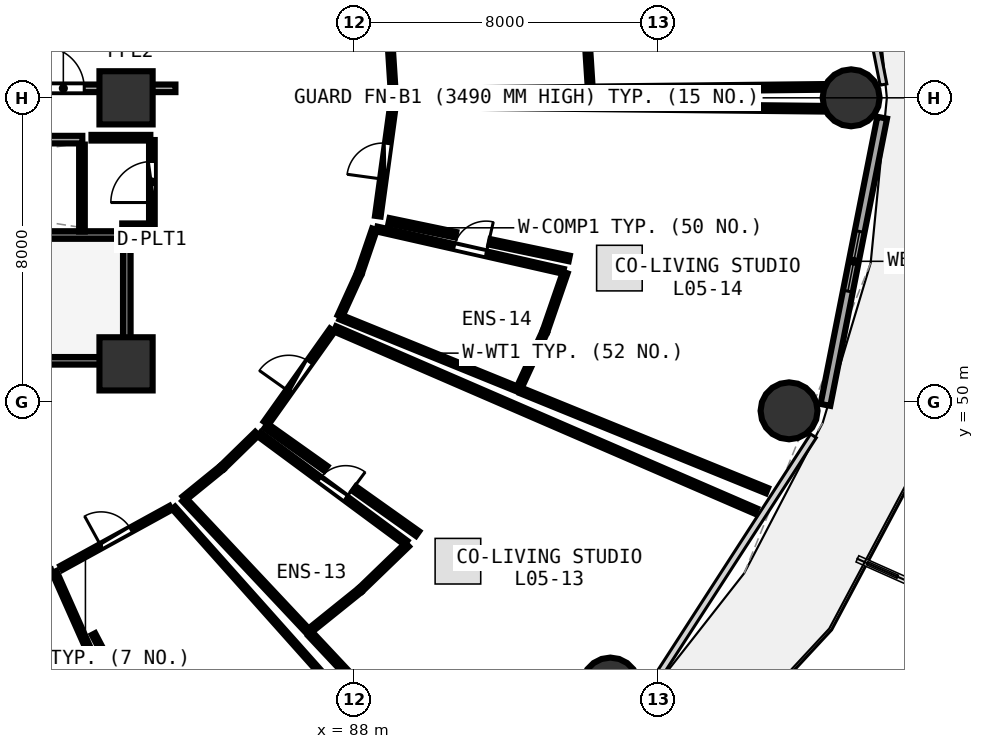
"""IFC4 building model, lengths in metres.
Left out: names, types, materials, properties, quantities, classifications, styles, units other than length and angle.
Written with IfcOpenShell. Run it as: python <this file> out.ifc"""

import sys

from ifc_helpers import new_model, si_unit, direction, frame, frame_2d, origin, origin_2d, place, context, subcontext, project, spatial, rectangle, circle, extrude, element, fill, save


model = new_model("IFC4")
c1 = context("Model", 3, precision=1e-05, world=origin(), true_north=direction((0.0, 1.0)))
c2 = subcontext(c1, "Body", "Model", "MODEL_VIEW")
j1 = project(units=[si_unit("LENGTHUNIT", "METRE"), si_unit("PLANEANGLEUNIT", "RADIAN")], contexts=[c1])
p1 = place(None, origin())
s1 = spatial("IfcSite", under=j1, at=p1, CompositionType="ELEMENT")
p2 = place(p1, origin())
s2 = spatial("IfcBuilding", under=s1, at=p2, CompositionType="ELEMENT")
p3 = place(p2, frame((0.0, 0.0, 22.5)))
s3 = spatial("IfcBuildingStorey", under=s2, at=p3, CompositionType="ELEMENT", Elevation=22.5)
for number, where, z_axis, x_axis in (
    (1, (82.0, 51.0, 0.0), (0.0, 0.0, 1.0), (1.0, 0.0, 0.0)),
    (2, (82.0, 58.0, 0.0), (0.0, 0.0, 1.0), (1.0, 0.0, 0.0)),
):
    element("IfcColumn", number, at=place(p3, frame(where, z_axis=z_axis, x_axis=x_axis)), inside=s3, PredefinedType="PILASTER", context=c2, shape_type="SweptSolid", body=[
        extrude(rectangle(XDim=1.4, YDim=1.4, at=origin_2d()), origin(), (0.0, 0.0, 1.0), 3.75),
    ])
for number, where, z_axis, x_axis in (
    (3, (101.08, 58.0, 0.0), (0.0, 0.0, 1.0), (1.0, 0.0, 0.0)),
    (4, (94.744, 42.522, 0.0), (0.0, 0.0, 1.0), (1.0, 0.0, 0.0)),
    (5, (99.447, 49.764, 0.0), (0.0, 0.0, 1.0), (1.0, 0.0, 0.0)),
):
    element("IfcColumn", number, at=place(p3, frame(where, z_axis=z_axis, x_axis=x_axis)), inside=s3, PredefinedType="COLUMN", context=c2, shape_type="SweptSolid", body=[
        extrude(circle(Radius=0.75, at=origin_2d()), origin(), (0.0, 0.0, 1.0), 3.75),
    ])
p4 = place(p3, frame((100.404, 49.92, 0.0), z_axis=(0.0, 0.0, 1.0), x_axis=(0.193726159581, 0.98105564322, 0.0)))
e6 = element("IfcWall", 6, at=p4, inside=s3, PredefinedType="SOLIDWALL", context=c2, shape_type="SweptSolid", body=[
    extrude(rectangle(XDim=7.703, YDim=0.26, at=frame_2d((3.851, 0.0))), origin(), (0.0, 0.0, 1.0), 3.475),
])
p5 = place(p4, frame((3.051, 0.0, 0.85)))
e7 = element("IfcOpeningElement", 7, at=p5, cuts=e6, PredefinedType="OPENING", context=c2, shape_type="SweptSolid", body=[
    extrude(rectangle(XDim=1.6, YDim=1.45, at=frame_2d((0.8, 0.725))), frame((0.0, 0.14, 0.0), z_axis=(0.0, -1.0, 0.0), x_axis=(1.0, 0.0, 0.0)), (0.0, 0.0, 1.0), 0.28),
])
p6 = place(p3, frame((74.0, 51.08, 0.0), z_axis=(0.0, 0.0, 1.0), x_axis=(1.0, 0.0, 0.0)))
e8 = element("IfcWall", 8, at=p6, inside=s3, PredefinedType="SHEAR", context=c2, shape_type="SweptSolid", body=[
    extrude(rectangle(XDim=7.9, YDim=0.2, at=frame_2d((3.95, 0.0))), origin(), (0.0, 0.0, 1.0), 3.49),
])
p7 = place(p6, frame((1.12, 0.0, 0.0)))
e9 = element("IfcOpeningElement", 9, at=p7, cuts=e8, PredefinedType="OPENING", context=c2, shape_type="SweptSolid", body=[
    extrude(rectangle(XDim=1.05, YDim=2.1, at=frame_2d((0.525, 1.05))), frame((0.0, 0.11, 0.0), z_axis=(0.0, -1.0, 0.0), x_axis=(1.0, 0.0, 0.0)), (0.0, 0.0, 1.0), 0.22),
])
p8 = place(p3, frame((82.02, 51.2, 0.0), z_axis=(0.0, 0.0, 1.0), x_axis=(0.0, 1.0, 0.0)))
e10 = element("IfcWall", 10, at=p8, inside=s3, PredefinedType="SHEAR", context=c2, shape_type="SweptSolid", body=[
    extrude(rectangle(XDim=3.07, YDim=0.2, at=frame_2d((1.535, 0.0))), origin(), (0.0, 0.0, 1.0), 3.49),
])
p9 = place(p3, frame((81.9, 54.39, 0.0), z_axis=(0.0, 0.0, 1.0), x_axis=(-1.0, 0.0, 0.0)))
e11 = element("IfcWall", 11, at=p9, inside=s3, PredefinedType="SHEAR", context=c2, shape_type="SweptSolid", body=[
    extrude(rectangle(XDim=8.46, YDim=0.2, at=frame_2d((4.23, 0.0))), origin(), (0.0, 0.0, 1.0), 3.49),
])
p10 = place(p3, frame((79.3, 58.25, 0.0), z_axis=(0.0, 0.0, 1.0), x_axis=(1.0, 0.0, 0.0)))
e12 = element("IfcWall", 12, at=p10, inside=s3, PredefinedType="SOLIDWALL", context=c2, shape_type="SweptSolid", body=[
    extrude(rectangle(XDim=4.0, YDim=0.2, at=frame_2d((2.0, 0.0))), origin(), (0.0, 0.0, 1.0), 2.775),
])
p11 = place(p10, frame((0.5, 0.0, 0.0)))
e13 = element("IfcOpeningElement", 13, at=p11, cuts=e12, PredefinedType="OPENING", context=c2, shape_type="SweptSolid", body=[
    extrude(rectangle(XDim=1.1, YDim=2.1, at=frame_2d((0.55, 1.05))), frame((0.0, 0.11, 0.0), z_axis=(0.0, -1.0, 0.0), x_axis=(1.0, 0.0, 0.0)), (0.0, 0.0, 1.0), 0.22),
])
p12 = place(p3, frame((66.45, 56.9, 0.0), z_axis=(0.0, 0.0, 1.0), x_axis=(1.0, 0.0, 0.0)))
e14 = element("IfcWall", 14, at=p12, inside=s3, PredefinedType="SOLIDWALL", context=c2, shape_type="SweptSolid", body=[
    extrude(rectangle(XDim=14.4, YDim=0.2, at=frame_2d((7.2, 0.0))), origin(), (0.0, 0.0, 1.0), 3.48),
])
p13 = place(p3, frame((80.84, 54.48, 0.0), z_axis=(0.0, 0.0, 1.0), x_axis=(0.0, 1.0, 0.0)))
e15 = element("IfcWall", 15, at=p13, inside=s3, PredefinedType="PARTITIONING", context=c2, shape_type="SweptSolid", body=[
    extrude(rectangle(XDim=2.29, YDim=0.15, at=frame_2d((1.145, 0.0))), origin(), (0.0, 0.0, 1.0), 3.48),
])
p14 = place(p3, frame((82.68, 54.68, 0.0), z_axis=(0.0, 0.0, 1.0), x_axis=(0.0, 1.0, 0.0)))
e16 = element("IfcWall", 16, at=p14, inside=s3, PredefinedType="PARTITIONING", context=c2, shape_type="SweptSolid", body=[
    extrude(rectangle(XDim=2.21, YDim=0.15, at=frame_2d((1.105, 0.0))), origin(), (0.0, 0.0, 1.0), 3.48),
])
p15 = place(p14, frame((0.565, 0.0, 0.0)))
e17 = element("IfcOpeningElement", 17, at=p15, cuts=e16, PredefinedType="OPENING", context=c2, shape_type="SweptSolid", body=[
    extrude(rectangle(XDim=1.08, YDim=2.1, at=frame_2d((0.54, 1.05))), frame((0.0, 0.085, 0.0), z_axis=(0.0, -1.0, 0.0), x_axis=(1.0, 0.0, 0.0)), (0.0, 0.0, 1.0), 0.17),
])
p16 = place(p3, frame((77.58, 44.768, 0.0), z_axis=(0.0, 0.0, 1.0), x_axis=(0.955754448098, 0.294165659011, 0.0)))
e18 = element("IfcWall", 18, at=p16, inside=s3, PredefinedType="PLUMBINGWALL", context=c2, shape_type="SweptSolid", body=[
    extrude(rectangle(XDim=2.579, YDim=0.13, at=frame_2d((1.29, 0.0))), origin(), (0.0, 0.0, 1.0), 3.235),
])
p17 = place(p16, frame((0.86, 0.0, 0.0)))
e19 = element("IfcOpeningElement", 19, at=p17, cuts=e18, PredefinedType="OPENING", context=c2, shape_type="SweptSolid", body=[
    extrude(rectangle(XDim=0.86, YDim=2.05, at=frame_2d((0.43, 1.025))), frame((0.0, 0.075, 0.0), z_axis=(0.0, -1.0, 0.0), x_axis=(1.0, 0.0, 0.0)), (0.0, 0.0, 1.0), 0.15),
])
p18 = place(p3, frame((80.299, 45.632, 0.0), z_axis=(0.0, 0.0, 1.0), x_axis=(0.876387079092, 0.481607399861, 0.0)))
e20 = element("IfcWall", 20, at=p18, inside=s3, PredefinedType="PARTITIONING", context=c2, shape_type="SweptSolid", body=[
    extrude(rectangle(XDim=3.281, YDim=0.12, at=frame_2d((1.641, 0.0))), origin(), (0.0, 0.0, 1.0), 2.875),
])
p19 = place(p18, frame((1.191, 0.0, 0.0)))
e21 = element("IfcOpeningElement", 21, at=p19, cuts=e20, PredefinedType="OPENING", context=c2, shape_type="SweptSolid", body=[
    extrude(rectangle(XDim=0.9, YDim=2.08, at=frame_2d((0.45, 1.04))), frame((0.0, 0.07, 0.0), z_axis=(0.0, -1.0, 0.0), x_axis=(1.0, 0.0, 0.0)), (0.0, 0.0, 1.0), 0.14),
])
p20 = place(p3, frame((85.506, 49.143, 0.0), z_axis=(0.0, 0.0, 1.0), x_axis=(0.80412644244, -0.594458295063, 0.0)))
e22 = element("IfcWall", 22, at=p20, inside=s3, PredefinedType="PLUMBINGWALL", context=c2, shape_type="SweptSolid", body=[
    extrude(rectangle(XDim=4.799, YDim=0.13, at=frame_2d((2.399, 0.0))), origin(), (0.0, 0.0, 1.0), 2.875),
])
p21 = place(p20, frame((1.969, 0.0, 0.0)))
e23 = element("IfcOpeningElement", 23, at=p21, cuts=e22, PredefinedType="OPENING", context=c2, shape_type="SweptSolid", body=[
    extrude(rectangle(XDim=0.86, YDim=2.05, at=frame_2d((0.43, 1.025))), frame((0.0, 0.075, 0.0), z_axis=(0.0, -1.0, 0.0), x_axis=(1.0, 0.0, 0.0)), (0.0, 0.0, 1.0), 0.15),
])
p22 = place(p3, frame((85.686, 49.438, 0.0), z_axis=(0.0, 0.0, 1.0), x_axis=(0.579107689823, 0.815251055557, 0.0)))
e24 = element("IfcWall", 24, at=p22, inside=s3, PredefinedType="PARTITIONING", context=c2, shape_type="SweptSolid", body=[
    extrude(rectangle(XDim=3.005, YDim=0.15, at=frame_2d((1.503, 0.0))), origin(), (0.0, 0.0, 1.0), 2.875),
])
p23 = place(p22, frame((1.028, 0.0, 0.0)))
e25 = element("IfcOpeningElement", 25, at=p23, cuts=e24, PredefinedType="OPENING", context=c2, shape_type="SweptSolid", body=[
    extrude(rectangle(XDim=0.95, YDim=2.08, at=frame_2d((0.475, 1.04))), frame((0.0, 0.085, 0.0), z_axis=(0.0, -1.0, 0.0), x_axis=(1.0, 0.0, 0.0)), (0.0, 0.0, 1.0), 0.17),
])
p24 = place(p3, frame((88.603, 54.548, 0.0), z_axis=(0.0, 0.0, 1.0), x_axis=(0.975187669184, -0.221379786503, 0.0)))
e26 = element("IfcWall", 26, at=p24, inside=s3, PredefinedType="PLUMBINGWALL", context=c2, shape_type="SweptSolid", body=[
    extrude(rectangle(XDim=5.029, YDim=0.13, at=frame_2d((2.514, 0.0))), origin(), (0.0, 0.0, 1.0), 3.175),
])
p25 = place(p24, frame((2.084, 0.0, 0.0)))
e27 = element("IfcOpeningElement", 27, at=p25, cuts=e26, PredefinedType="OPENING", context=c2, shape_type="SweptSolid", body=[
    extrude(rectangle(XDim=0.86, YDim=2.05, at=frame_2d((0.43, 1.025))), frame((0.0, 0.075, 0.0), z_axis=(0.0, -1.0, 0.0), x_axis=(1.0, 0.0, 0.0)), (0.0, 0.0, 1.0), 0.15),
])
p26 = place(p3, frame((88.625, 54.885, 0.0), z_axis=(0.0, 0.0, 1.0), x_axis=(0.135838186105, 0.990731036758, 0.0)))
e28 = element("IfcWall", 28, at=p26, inside=s3, PredefinedType="PARTITIONING", context=c2, shape_type="SweptSolid", body=[
    extrude(rectangle(XDim=2.915, YDim=0.15, at=frame_2d((1.458, 0.0))), origin(), (0.0, 0.0, 1.0), 3.48),
])
p27 = place(p26, frame((0.983, 0.0, 0.0)))
e29 = element("IfcOpeningElement", 29, at=p27, cuts=e28, PredefinedType="OPENING", context=c2, shape_type="SweptSolid", body=[
    extrude(rectangle(XDim=0.95, YDim=2.08, at=frame_2d((0.475, 1.04))), frame((0.0, 0.085, 0.0), z_axis=(0.0, -1.0, 0.0), x_axis=(1.0, 0.0, 0.0)), (0.0, 0.0, 1.0), 0.17),
])
p28 = place(p3, frame((81.9, 54.62, 0.0), z_axis=(0.0, 0.0, 1.0), x_axis=(1.0, 0.0, 0.0)))
e30 = element("IfcWall", 30, at=p28, inside=s3, PredefinedType="PARTITIONING", context=c2, shape_type="SweptSolid", body=[
    extrude(rectangle(XDim=0.74, YDim=0.15, at=frame_2d((0.37, 0.0))), origin(), (0.0, 0.0, 1.0), 2.775),
])
p29 = place(p3, frame((82.64, 56.95, 0.0), z_axis=(0.0, 0.0, 1.0), x_axis=(-1.0, 0.0, 0.0)))
e31 = element("IfcWall", 31, at=p29, inside=s3, PredefinedType="PARTITIONING", context=c2, shape_type="SweptSolid", body=[
    extrude(rectangle(XDim=1.55, YDim=0.15, at=frame_2d((0.775, 0.0))), origin(), (0.0, 0.0, 1.0), 2.775),
])
p30 = place(p3, frame((89.028, 58.187, 0.0), z_axis=(0.0, 0.0, 1.0), x_axis=(-0.063661240763, 0.99797156594, 0.0)))
e32 = element("IfcWall", 32, at=p30, inside=s3, PredefinedType="PLUMBINGWALL", context=c2, shape_type="SweptSolid", body=[
    extrude(rectangle(XDim=1.197, YDim=0.13, at=frame_2d((0.598, 0.0))), origin(), (0.0, 0.0, 1.0), 2.875),
])
p31 = place(p3, frame((94.113, 59.845, 0.0), z_axis=(0.0, 0.0, 1.0), x_axis=(0.06383542257, -0.997960439509, 0.0)))
e33 = element("IfcWall", 33, at=p31, inside=s3, PredefinedType="PLUMBINGWALL", context=c2, shape_type="SweptSolid", body=[
    extrude(rectangle(XDim=1.606, YDim=0.13, at=frame_2d((0.803, 0.0))), origin(), (0.0, 0.0, 1.0), 3.48),
])
p32 = place(p3, frame((94.197, 58.222, 0.0), z_axis=(0.0, 0.0, 1.0), x_axis=(-0.999944081579, -0.010575146078, 0.0)))
e34 = element("IfcWall", 34, at=p32, inside=s3, PredefinedType="PLUMBINGWALL", context=c2, shape_type="SweptSolid", body=[
    extrude(rectangle(XDim=5.148, YDim=0.13, at=frame_2d((2.574, 0.0))), origin(), (0.0, 0.0, 1.0), 2.875),
])
p33 = place(p3, frame((100.36, 58.287, 0.0), z_axis=(0.0, 0.0, 1.0), x_axis=(-0.999943071294, -0.010670246996, 0.0)))
e35 = element("IfcWall", 35, at=p33, inside=s3, PredefinedType="PARTITIONING", context=c2, shape_type="SweptSolid", body=[
    extrude(rectangle(XDim=6.063, YDim=0.15, at=frame_2d((3.032, 0.0))), origin(), (0.0, 0.0, 1.0), 3.235),
])
p34 = place(p3, frame((80.111, 45.526, 0.0), z_axis=(0.0, 0.0, 1.0), x_axis=(0.405936178007, -0.913901427608, 0.0)))
e36 = element("IfcWall", 36, at=p34, inside=s3, PredefinedType="PLUMBINGWALL", context=c2, shape_type="SweptSolid", body=[
    extrude(rectangle(XDim=3.36, YDim=0.13, at=frame_2d((1.68, 0.0))), origin(), (0.0, 0.0, 1.0), 2.875),
])
p35 = place(p3, frame((83.254, 47.211, 0.0), z_axis=(0.0, 0.0, 1.0), x_axis=(0.66580890104, -0.746122313897, 0.0)))
e37 = element("IfcWall", 37, at=p35, inside=s3, PredefinedType="PARTITIONING", context=c2, shape_type="SweptSolid", body=[
    extrude(rectangle(XDim=11.399, YDim=0.1, at=frame_2d((5.7, 0.0))), origin(), (0.0, 0.0, 1.0), 2.875),
])
p36 = place(p3, frame((85.401, 35.769, 0.0), z_axis=(0.0, 0.0, 1.0), x_axis=(-0.464308397246, 0.885673592384, 0.0)))
e38 = element("IfcWall", 38, at=p36, inside=s3, PredefinedType="PARTITIONING", context=c2, shape_type="SweptSolid", body=[
    extrude(rectangle(XDim=9.17, YDim=0.1, at=frame_2d((4.585, 0.0))), origin(), (0.0, 0.0, 1.0), 2.875),
])
p37 = place(p3, frame((83.53, 47.461, 0.0), z_axis=(0.0, 0.0, 1.0), x_axis=(0.77596084644, 0.63078107517, 0.0)))
e39 = element("IfcWall", 39, at=p37, inside=s3, PredefinedType="PLUMBINGWALL", context=c2, shape_type="SweptSolid", body=[
    extrude(rectangle(XDim=1.268, YDim=0.13, at=frame_2d((0.634, 0.0))), origin(), (0.0, 0.0, 1.0), 2.875),
])
p38 = place(p3, frame((84.543, 48.287, 0.0), z_axis=(0.0, 0.0, 1.0), x_axis=(0.715980731769, 0.698120041064, 0.0)))
e40 = element("IfcWall", 40, at=p38, inside=s3, PredefinedType="PLUMBINGWALL", context=c2, shape_type="SweptSolid", body=[
    extrude(rectangle(XDim=1.258, YDim=0.13, at=frame_2d((0.629, 0.0))), origin(), (0.0, 0.0, 1.0), 2.875),
])
p39 = place(p3, frame((89.399, 46.241, 0.0), z_axis=(0.0, 0.0, 1.0), x_axis=(-0.719664402118, -0.694322078234, 0.0)))
e41 = element("IfcWall", 41, at=p39, inside=s3, PredefinedType="PLUMBINGWALL", context=c2, shape_type="SweptSolid", body=[
    extrude(rectangle(XDim=1.696, YDim=0.13, at=frame_2d((0.848, 0.0))), origin(), (0.0, 0.0, 1.0), 2.875),
])
p40 = place(p3, frame((88.148, 45.038, 0.0), z_axis=(0.0, 0.0, 1.0), x_axis=(-0.778806140639, -0.627264693174, 0.0)))
e42 = element("IfcWall", 42, at=p40, inside=s3, PredefinedType="PLUMBINGWALL", context=c2, shape_type="SweptSolid", body=[
    extrude(rectangle(XDim=1.713, YDim=0.13, at=frame_2d((0.856, 0.0))), origin(), (0.0, 0.0, 1.0), 3.175),
])
p41 = place(p3, frame((86.785, 43.966, 0.0), z_axis=(0.0, 0.0, 1.0), x_axis=(-0.68469858897, 0.728826345753, 0.0)))
e43 = element("IfcWall", 43, at=p41, inside=s3, PredefinedType="PLUMBINGWALL", context=c2, shape_type="SweptSolid", body=[
    extrude(rectangle(XDim=4.758, YDim=0.13, at=frame_2d((2.379, 0.0))), origin(), (0.0, 0.0, 1.0), 2.875),
])
p42 = place(p3, frame((87.498, 51.921, 0.0), z_axis=(0.0, 0.0, 1.0), x_axis=(0.917695041134, -0.397285554077, 0.0)))
e44 = element("IfcWall", 44, at=p42, inside=s3, PredefinedType="PARTITIONING", context=c2, shape_type="SweptSolid", body=[
    extrude(rectangle(XDim=12.07, YDim=0.15, at=frame_2d((6.035, 0.0))), origin(), (0.0, 0.0, 1.0), 2.875),
])
p43 = place(p3, frame((91.368, 39.078, 0.0), z_axis=(0.0, 0.0, 1.0), x_axis=(-0.684296653493, 0.729203736975, 0.0)))
e45 = element("IfcWall", 45, at=p43, inside=s3, PredefinedType="PARTITIONING", context=c2, shape_type="SweptSolid", body=[
    extrude(rectangle(XDim=6.6, YDim=0.15, at=frame_2d((3.3, 0.0))), origin(), (0.0, 0.0, 1.0), 2.875),
])
p44 = place(p3, frame((89.671, 46.533, 0.0), z_axis=(0.0, 0.0, 1.0), x_axis=(-0.815281399299, 0.579064970411, 0.0)))
e46 = element("IfcWall", 46, at=p44, inside=s3, PredefinedType="PARTITIONING", context=c2, shape_type="SweptSolid", body=[
    extrude(rectangle(XDim=2.042, YDim=0.15, at=frame_2d((1.021, 0.0))), origin(), (0.0, 0.0, 1.0), 3.48),
])
p45 = place(p3, frame((87.256, 48.249, 0.0), z_axis=(0.0, 0.0, 1.0), x_axis=(-0.815270043711, 0.579080957922, 0.0)))
e47 = element("IfcWall", 47, at=p45, inside=s3, PredefinedType="PARTITIONING", context=c2, shape_type="SweptSolid", body=[
    extrude(rectangle(XDim=1.929, YDim=0.15, at=frame_2d((0.964, 0.0))), origin(), (0.0, 0.0, 1.0), 3.235),
])
p46 = place(p3, frame((87.628, 52.255, 0.0), z_axis=(0.0, 0.0, 1.0), x_axis=(0.4138937247, 0.910325208183, 0.0)))
e48 = element("IfcWall", 48, at=p46, inside=s3, PredefinedType="PLUMBINGWALL", context=c2, shape_type="SweptSolid", body=[
    extrude(rectangle(XDim=1.216, YDim=0.13, at=frame_2d((0.608, 0.0))), origin(), (0.0, 0.0, 1.0), 3.48),
])
p47 = place(p3, frame((88.146, 53.399, 0.0), z_axis=(0.0, 0.0, 1.0), x_axis=(0.323735286305, 0.946147696928, 0.0)))
e49 = element("IfcWall", 49, at=p47, inside=s3, PredefinedType="PLUMBINGWALL", context=c2, shape_type="SweptSolid", body=[
    extrude(rectangle(XDim=1.208, YDim=0.13, at=frame_2d((0.604, 0.0))), origin(), (0.0, 0.0, 1.0), 3.48),
])
p48 = place(p3, frame((93.559, 53.402, 0.0), z_axis=(0.0, 0.0, 1.0), x_axis=(-0.326356647952, -0.945246707657, 0.0)))
e50 = element("IfcWall", 50, at=p48, inside=s3, PredefinedType="PLUMBINGWALL", context=c2, shape_type="SweptSolid", body=[
    extrude(rectangle(XDim=1.624, YDim=0.13, at=frame_2d((0.812, 0.0))), origin(), (0.0, 0.0, 1.0), 3.48),
])
p49 = place(p3, frame((93.014, 51.83, 0.0), z_axis=(0.0, 0.0, 1.0), x_axis=(-0.41762687648, -0.908618617486, 0.0)))
e51 = element("IfcWall", 51, at=p49, inside=s3, PredefinedType="PLUMBINGWALL", context=c2, shape_type="SweptSolid", body=[
    extrude(rectangle(XDim=1.634, YDim=0.13, at=frame_2d((0.817, 0.0))), origin(), (0.0, 0.0, 1.0), 2.875),
])
p50 = place(p3, frame((92.304, 50.334, 0.0), z_axis=(0.0, 0.0, 1.0), x_axis=(-0.926504606816, 0.376283421835, 0.0)))
e52 = element("IfcWall", 52, at=p50, inside=s3, PredefinedType="PLUMBINGWALL", context=c2, shape_type="SweptSolid", body=[
    extrude(rectangle(XDim=5.036, YDim=0.13, at=frame_2d((2.518, 0.0))), origin(), (0.0, 0.0, 1.0), 2.875),
])
p51 = place(p3, frame((89.069, 57.833, 0.0), z_axis=(0.0, 0.0, 1.0), x_axis=(0.999943877154, -0.010594458135, 0.0)))
e53 = element("IfcWall", 53, at=p51, inside=s3, PredefinedType="PARTITIONING", context=c2, shape_type="SweptSolid", body=[
    extrude(rectangle(XDim=11.292, YDim=0.15, at=frame_2d((5.646, 0.0))), origin(), (0.0, 0.0, 1.0), 2.875),
])
p52 = place(p3, frame((98.865, 47.664, 0.0), z_axis=(0.0, 0.0, 1.0), x_axis=(-0.926325178802, 0.376724917038, 0.0)))
e54 = element("IfcWall", 54, at=p52, inside=s3, PredefinedType="PARTITIONING", context=c2, shape_type="SweptSolid", body=[
    extrude(rectangle(XDim=6.983, YDim=0.15, at=frame_2d((3.492, 0.0))), origin(), (0.0, 0.0, 1.0), 2.875),
])
p53 = place(p3, frame((93.663, 53.773, 0.0), z_axis=(0.0, 0.0, 1.0), x_axis=(-0.978922282622, 0.204233113343, 0.0)))
e55 = element("IfcWall", 55, at=p53, inside=s3, PredefinedType="PARTITIONING", context=c2, shape_type="SweptSolid", body=[
    extrude(rectangle(XDim=2.133, YDim=0.15, at=frame_2d((1.066, 0.0))), origin(), (0.0, 0.0, 1.0), 3.175),
])
p54 = place(p3, frame((90.675, 54.397, 0.0), z_axis=(0.0, 0.0, 1.0), x_axis=(-0.978929424395, 0.204198878681, 0.0)))
e56 = element("IfcWall", 56, at=p54, inside=s3, PredefinedType="PARTITIONING", context=c2, shape_type="SweptSolid", body=[
    extrude(rectangle(XDim=1.793, YDim=0.15, at=frame_2d((0.897, 0.0))), origin(), (0.0, 0.0, 1.0), 3.235),
])
p55 = place(p5, origin())
e57 = element("IfcWindow", 57, at=p55, inside=s3, PartitioningType="SINGLE_PANEL", PredefinedType="WINDOW", context=c2, shape_type="SweptSolid", body=[
    extrude(rectangle(XDim=1.6, YDim=1.45, at=frame_2d((0.8, 0.725))), frame((0.0, 0.03, 0.0), z_axis=(0.0, -1.0, 0.0), x_axis=(1.0, 0.0, 0.0)), (0.0, 0.0, 1.0), 0.06),
])
fill(e7, e57)
p56 = place(p11, frame((1.1, 0.0, 0.0), z_axis=(0.0, 0.0, 1.0), x_axis=(-1.0, 0.0, 0.0)))
e58 = element("IfcDoor", 58, at=p56, inside=s3, OperationType="SINGLE_SWING_RIGHT", PredefinedType="DOOR", context=c2, shape_type="SweptSolid", body=[
    extrude(rectangle(XDim=1.1, YDim=2.1, at=frame_2d((0.55, 1.05))), frame((0.0, 0.025, 0.0), z_axis=(0.0, -1.0, 0.0), x_axis=(1.0, 0.0, 0.0)), (0.0, 0.0, 1.0), 0.05),
])
fill(e13, e58)
p57 = place(p15, origin())
e59 = element("IfcDoor", 59, at=p57, inside=s3, OperationType="SINGLE_SWING_LEFT", PredefinedType="DOOR", context=c2, shape_type="SweptSolid", body=[
    extrude(rectangle(XDim=1.08, YDim=2.1, at=frame_2d((0.54, 1.05))), frame((0.0, 0.025, 0.0), z_axis=(0.0, -1.0, 0.0), x_axis=(1.0, 0.0, 0.0)), (0.0, 0.0, 1.0), 0.05),
])
fill(e17, e59)
p58 = place(p19, origin())
e60 = element("IfcDoor", 60, at=p58, inside=s3, OperationType="SINGLE_SWING_LEFT", PredefinedType="DOOR", context=c2, shape_type="SweptSolid", body=[
    extrude(rectangle(XDim=0.9, YDim=2.08, at=frame_2d((0.45, 1.04))), frame((0.0, 0.025, 0.0), z_axis=(0.0, -1.0, 0.0), x_axis=(1.0, 0.0, 0.0)), (0.0, 0.0, 1.0), 0.05),
])
fill(e21, e60)
p59 = place(p21, origin())
e61 = element("IfcDoor", 61, at=p59, inside=s3, OperationType="SINGLE_SWING_RIGHT", PredefinedType="DOOR", context=c2, shape_type="SweptSolid", body=[
    extrude(rectangle(XDim=0.86, YDim=2.05, at=frame_2d((0.43, 1.025))), frame((0.0, 0.025, 0.0), z_axis=(0.0, -1.0, 0.0), x_axis=(1.0, 0.0, 0.0)), (0.0, 0.0, 1.0), 0.05),
])
fill(e23, e61)
p60 = place(p23, origin())
e62 = element("IfcDoor", 62, at=p60, inside=s3, OperationType="SINGLE_SWING_LEFT", PredefinedType="DOOR", context=c2, shape_type="SweptSolid", body=[
    extrude(rectangle(XDim=0.95, YDim=2.08, at=frame_2d((0.475, 1.04))), frame((0.0, 0.025, 0.0), z_axis=(0.0, -1.0, 0.0), x_axis=(1.0, 0.0, 0.0)), (0.0, 0.0, 1.0), 0.05),
])
fill(e25, e62)
p61 = place(p25, origin())
e63 = element("IfcDoor", 63, at=p61, inside=s3, OperationType="SINGLE_SWING_RIGHT", PredefinedType="DOOR", context=c2, shape_type="SweptSolid", body=[
    extrude(rectangle(XDim=0.86, YDim=2.05, at=frame_2d((0.43, 1.025))), frame((0.0, 0.025, 0.0), z_axis=(0.0, -1.0, 0.0), x_axis=(1.0, 0.0, 0.0)), (0.0, 0.0, 1.0), 0.05),
])
fill(e27, e63)
p62 = place(p27, origin())
e64 = element("IfcDoor", 64, at=p62, inside=s3, OperationType="SINGLE_SWING_LEFT", PredefinedType="DOOR", context=c2, shape_type="SweptSolid", body=[
    extrude(rectangle(XDim=0.95, YDim=2.08, at=frame_2d((0.475, 1.04))), frame((0.0, 0.025, 0.0), z_axis=(0.0, -1.0, 0.0), x_axis=(1.0, 0.0, 0.0)), (0.0, 0.0, 1.0), 0.05),
])
fill(e29, e64)
save(model, sys.argv[1])
